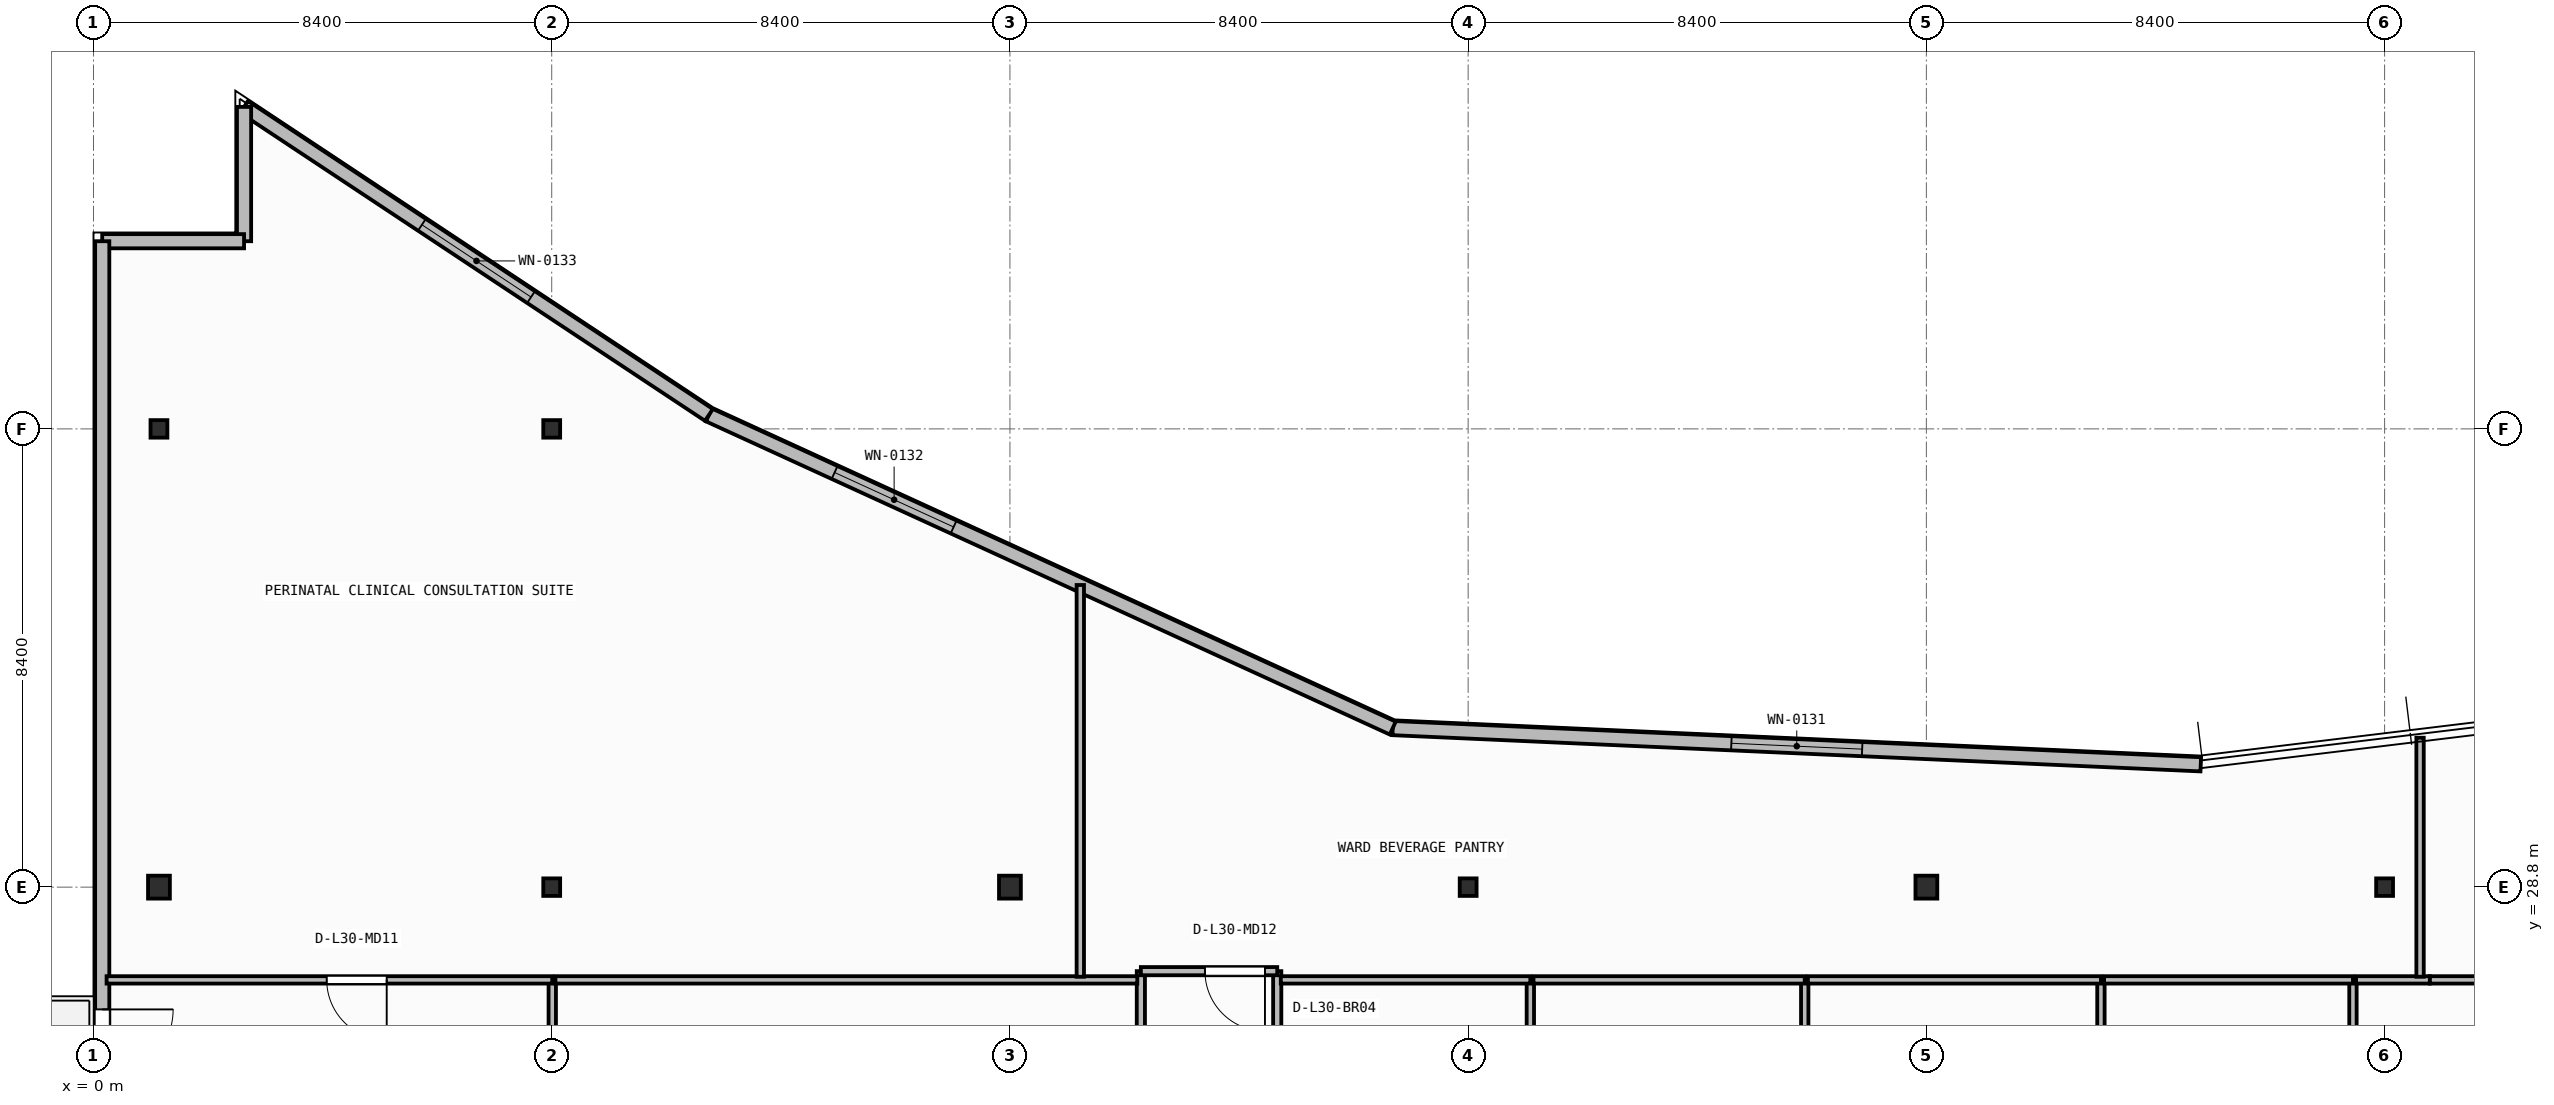
"""IFC4 building model, lengths in metres.
Left out: names, types, materials, properties, quantities, classifications, styles, units other than length and angle.
Written with IfcOpenShell. Run it as: python <this file> out.ifc"""

import sys

from ifc_helpers import new_model, si_unit, direction, frame, frame_2d, origin, origin_2d, place, context, subcontext, project, spatial, rectangle, i_section, extrude, element, fill, save


model = new_model("IFC4")
c1 = context("Model", 3, precision=1e-05, world=origin(), true_north=direction((0.0, 1.0)))
c2 = subcontext(c1, "Body", "Model", "MODEL_VIEW")
j1 = project(units=[si_unit("LENGTHUNIT", "METRE"), si_unit("PLANEANGLEUNIT", "RADIAN")], contexts=[c1])
p1 = place(None, origin())
s1 = spatial("IfcSite", under=j1, at=p1, CompositionType="ELEMENT")
p2 = place(p1, origin())
s2 = spatial("IfcBuilding", under=s1, at=p2, CompositionType="ELEMENT")
p3 = place(p2, frame((0.0, 0.0, 123.1)))
s3 = spatial("IfcBuildingStorey", under=s2, at=p3, CompositionType="ELEMENT", Elevation=123.1)
p4 = place(p3, frame((1.2, 28.8, 0.0), z_axis=(0.0, 0.0, 1.0), x_axis=(1.0, 0.0, 0.0)))
e1 = element("IfcColumn", 1, at=p4, inside=s3, PredefinedType="COLUMN", context=c2, shape_type="SweptSolid", body=[
    extrude(i_section(OverallWidth=0.4, OverallDepth=0.42, WebThickness=0.025, FlangeThickness=0.04, at=origin_2d()), origin(), (0.0, 0.0, 1.0), 3.95),
])
p5 = place(p3, frame((8.4, 28.8, 0.0), z_axis=(0.0, 0.0, 1.0), x_axis=(1.0, 0.0, 0.0)))
e2 = element("IfcColumn", 2, at=p5, inside=s3, PredefinedType="COLUMN", context=c2, shape_type="SweptSolid", body=[
    extrude(i_section(OverallWidth=0.309, OverallDepth=0.321, WebThickness=0.014, FlangeThickness=0.022, FilletRadius=0.017, at=origin_2d()), origin(), (0.0, 0.0, 1.0), 3.95),
])
p6 = place(p3, frame((16.8, 28.8, 0.0), z_axis=(0.0, 0.0, 1.0), x_axis=(1.0, 0.0, 0.0)))
e3 = element("IfcColumn", 3, at=p6, inside=s3, PredefinedType="COLUMN", context=c2, shape_type="SweptSolid", body=[
    extrude(i_section(OverallWidth=0.4, OverallDepth=0.42, WebThickness=0.025, FlangeThickness=0.04, at=origin_2d()), origin(), (0.0, 0.0, 1.0), 3.95),
])
p7 = place(p3, frame((25.2, 28.8, 0.0), z_axis=(0.0, 0.0, 1.0), x_axis=(1.0, 0.0, 0.0)))
e4 = element("IfcColumn", 4, at=p7, inside=s3, PredefinedType="COLUMN", context=c2, shape_type="SweptSolid", body=[
    extrude(i_section(OverallWidth=0.309, OverallDepth=0.321, WebThickness=0.014, FlangeThickness=0.022, FilletRadius=0.017, at=origin_2d()), origin(), (0.0, 0.0, 1.0), 3.95),
])
p8 = place(p3, frame((33.6, 28.8, 0.0), z_axis=(0.0, 0.0, 1.0), x_axis=(1.0, 0.0, 0.0)))
e5 = element("IfcColumn", 5, at=p8, inside=s3, PredefinedType="COLUMN", context=c2, shape_type="SweptSolid", body=[
    extrude(i_section(OverallWidth=0.4, OverallDepth=0.42, WebThickness=0.025, FlangeThickness=0.04, at=origin_2d()), origin(), (0.0, 0.0, 1.0), 3.95),
])
for number, where, z_axis, x_axis in (
    (6, (42.0, 28.8, 0.0), (0.0, 0.0, 1.0), (1.0, 0.0, 0.0)),
    (7, (1.2, 37.2, 0.0), (0.0, 0.0, 1.0), (1.0, 0.0, 0.0)),
    (8, (8.4, 37.2, 0.0), (0.0, 0.0, 1.0), (1.0, 0.0, 0.0)),
):
    element("IfcColumn", number, at=place(p3, frame(where, z_axis=z_axis, x_axis=x_axis)), inside=s3, PredefinedType="COLUMN", context=c2, shape_type="SweptSolid", body=[
        extrude(i_section(OverallWidth=0.309, OverallDepth=0.321, WebThickness=0.014, FlangeThickness=0.022, FilletRadius=0.017, at=origin_2d()), origin(), (0.0, 0.0, 1.0), 3.95),
    ])
p9 = place(p3, frame((38.63, 31.052, 0.0), z_axis=(0.0, 0.0, 1.0), x_axis=(-0.998996592956, 0.044786239663, 0.0)))
e9 = element("IfcWall", 9, at=p9, inside=s3, PredefinedType="STANDARD", context=c2, shape_type="SweptSolid", body=[
    extrude(rectangle(XDim=14.827, YDim=0.26, at=frame_2d((7.414, 0.0))), origin(), (0.0, 0.0, 1.0), 3.71),
])
p10 = place(p9, frame((6.214, 0.0, 0.9)))
e10 = element("IfcOpeningElement", 10, at=p10, cuts=e9, PredefinedType="OPENING", context=c2, shape_type="SweptSolid", body=[
    extrude(rectangle(XDim=2.4, YDim=1.65, at=frame_2d((1.2, 0.825))), frame((0.0, 0.14, 0.0), z_axis=(0.0, -1.0, 0.0), x_axis=(1.0, 0.0, 0.0)), (0.0, 0.0, 1.0), 0.28),
])
p11 = place(p3, frame((23.818, 31.716, 0.0), z_axis=(0.0, 0.0, 1.0), x_axis=(-0.909209527513, 0.416338846471, 0.0)))
e11 = element("IfcWall", 11, at=p11, inside=s3, PredefinedType="STANDARD", context=c2, shape_type="SweptSolid", body=[
    extrude(rectangle(XDim=13.787, YDim=0.26, at=frame_2d((6.894, 0.0))), origin(), (0.0, 0.0, 1.0), 3.71),
])
p12 = place(p11, frame((8.854, 0.0, 0.9)))
e12 = element("IfcOpeningElement", 12, at=p12, cuts=e11, PredefinedType="OPENING", context=c2, shape_type="SweptSolid", body=[
    extrude(rectangle(XDim=2.4, YDim=1.65, at=frame_2d((1.2, 0.825))), frame((0.0, 0.14, 0.0), z_axis=(0.0, -1.0, 0.0), x_axis=(1.0, 0.0, 0.0)), (0.0, 0.0, 1.0), 0.28),
])
p13 = place(p3, frame((11.282, 37.456, 0.0), z_axis=(0.0, 0.0, 1.0), x_axis=(-0.833630474253, 0.552322580017, 0.0)))
e13 = element("IfcWall", 13, at=p13, inside=s3, PredefinedType="STANDARD", context=c2, shape_type="SweptSolid", body=[
    extrude(rectangle(XDim=10.223, YDim=0.26, at=frame_2d((5.111, 0.0))), origin(), (0.0, 0.0, 1.0), 3.71),
])
p14 = place(p13, frame((3.911, 0.0, 0.9)))
e14 = element("IfcOpeningElement", 14, at=p14, cuts=e13, PredefinedType="OPENING", context=c2, shape_type="SweptSolid", body=[
    extrude(rectangle(XDim=2.4, YDim=1.65, at=frame_2d((1.2, 0.825))), frame((0.0, 0.14, 0.0), z_axis=(0.0, -1.0, 0.0), x_axis=(1.0, 0.0, 0.0)), (0.0, 0.0, 1.0), 0.28),
])
p15 = place(p3, frame((2.76, 43.102, 0.0), z_axis=(0.0, 0.0, 1.0), x_axis=(0.0, -1.0, 0.0)))
e15 = element("IfcWall", 15, at=p15, inside=s3, PredefinedType="STANDARD", context=c2, shape_type="SweptSolid", body=[
    extrude(rectangle(XDim=2.462, YDim=0.26, at=frame_2d((1.231, 0.0))), origin(), (0.0, 0.0, 1.0), 3.71),
])
p16 = place(p3, frame((2.76, 40.64, 0.0), z_axis=(0.0, 0.0, 1.0), x_axis=(-1.0, 0.0, 0.0)))
e16 = element("IfcWall", 16, at=p16, inside=s3, PredefinedType="STANDARD", context=c2, shape_type="SweptSolid", body=[
    extrude(rectangle(XDim=2.6, YDim=0.26, at=frame_2d((1.3, 0.0))), origin(), (0.0, 0.0, 1.0), 3.71),
])
p17 = place(p3, frame((0.16, 40.64, 0.0), z_axis=(0.0, 0.0, 1.0), x_axis=(0.0, -1.0, 0.0)))
e17 = element("IfcWall", 17, at=p17, inside=s3, PredefinedType="STANDARD", context=c2, shape_type="SweptSolid", body=[
    extrude(rectangle(XDim=37.88, YDim=0.26, at=frame_2d((18.94, 0.0))), origin(), (0.0, 0.0, 1.0), 3.71),
])
p18 = place(p17, frame((14.081, 0.0, 0.0)))
e18 = element("IfcOpeningElement", 18, at=p18, cuts=e17, PredefinedType="OPENING", context=c2, shape_type="SweptSolid", body=[
    extrude(rectangle(XDim=1.3, YDim=2.15, at=frame_2d((0.65, 1.075))), frame((0.0, 0.14, 0.0), z_axis=(0.0, -1.0, 0.0), x_axis=(1.0, 0.0, 0.0)), (0.0, 0.0, 1.0), 0.28),
])
p19 = place(p17, frame((21.856, 0.0, 0.9)))
e19 = element("IfcOpeningElement", 19, at=p19, cuts=e17, PredefinedType="OPENING", context=c2, shape_type="SweptSolid", body=[
    extrude(rectangle(XDim=2.4, YDim=1.65, at=frame_2d((1.2, 0.825))), frame((0.0, 0.14, 0.0), z_axis=(0.0, -1.0, 0.0), x_axis=(1.0, 0.0, 0.0)), (0.0, 0.0, 1.0), 0.28),
])
p20 = place(p3, frame((19.2, 27.26, 0.0), z_axis=(0.0, 0.0, 1.0), x_axis=(0.0, -1.0, 0.0)))
e20 = element("IfcWall", 20, at=p20, inside=s3, PredefinedType="PARTITIONING", context=c2, shape_type="SweptSolid", body=[
    extrude(rectangle(XDim=6.482, YDim=0.15, at=frame_2d((3.241, 0.0))), origin(), (0.0, 0.0, 1.0), 3.71),
])
p21 = place(p20, frame((2.068, 0.0, 0.0)))
e21 = element("IfcOpeningElement", 21, at=p21, cuts=e20, PredefinedType="OPENING", context=c2, shape_type="SweptSolid", body=[
    extrude(rectangle(XDim=1.1, YDim=2.1, at=frame_2d((0.55, 1.05))), frame((0.0, 0.085, 0.0), z_axis=(0.0, -1.0, 0.0), x_axis=(1.0, 0.0, 0.0)), (0.0, 0.0, 1.0), 0.17),
])
p22 = place(p3, frame((21.7, 23.784, 0.0), z_axis=(0.0, 0.0, 1.0), x_axis=(0.0, 1.0, 0.0)))
e22 = element("IfcWall", 22, at=p22, inside=s3, PredefinedType="PARTITIONING", context=c2, shape_type="SweptSolid", body=[
    extrude(rectangle(XDim=3.476, YDim=0.15, at=frame_2d((1.738, 0.0))), origin(), (0.0, 0.0, 1.0), 3.71),
])
p23 = place(p22, frame((1.088, 0.0, 0.0)))
e23 = element("IfcOpeningElement", 23, at=p23, cuts=e22, PredefinedType="OPENING", context=c2, shape_type="SweptSolid", body=[
    extrude(rectangle(XDim=1.3, YDim=2.15, at=frame_2d((0.65, 1.075))), frame((0.0, 0.085, 0.0), z_axis=(0.0, -1.0, 0.0), x_axis=(1.0, 0.0, 0.0)), (0.0, 0.0, 1.0), 0.17),
])
p24 = place(p3, frame((21.7, 27.26, 0.0), z_axis=(0.0, 0.0, 1.0), x_axis=(-1.0, 0.0, 0.0)))
e24 = element("IfcWall", 24, at=p24, inside=s3, PredefinedType="PARTITIONING", context=c2, shape_type="SweptSolid", body=[
    extrude(rectangle(XDim=2.5, YDim=0.15, at=frame_2d((1.25, 0.0))), origin(), (0.0, 0.0, 1.0), 3.71),
])
p25 = place(p24, frame((0.225, 0.0, 0.0)))
e25 = element("IfcOpeningElement", 25, at=p25, cuts=e24, PredefinedType="OPENING", context=c2, shape_type="SweptSolid", body=[
    extrude(rectangle(XDim=1.1, YDim=2.1, at=frame_2d((0.55, 1.05))), frame((0.0, 0.085, 0.0), z_axis=(0.0, -1.0, 0.0), x_axis=(1.0, 0.0, 0.0)), (0.0, 0.0, 1.0), 0.17),
])
p26 = place(p3, frame((8.41, 20.607, 0.0), z_axis=(0.0, 0.0, 1.0), x_axis=(0.0, 1.0, 0.0)))
e26 = element("IfcWall", 26, at=p26, inside=s3, PredefinedType="PARTITIONING", context=c2, shape_type="SweptSolid", body=[
    extrude(rectangle(XDim=6.493, YDim=0.135, at=frame_2d((3.246, 0.0))), origin(), (0.0, 0.0, 1.0), 3.152),
])
p27 = place(p3, frame((8.41, 27.1, 0.0), z_axis=(0.0, 0.0, 1.0), x_axis=(-1.0, 0.0, 0.0)))
e27 = element("IfcWall", 27, at=p27, inside=s3, PredefinedType="PARTITIONING", context=c2, shape_type="SweptSolid", body=[
    extrude(rectangle(XDim=8.17, YDim=0.135, at=frame_2d((4.085, 0.0))), origin(), (0.0, 0.0, 1.0), 3.71),
])
p28 = place(p27, frame((3.035, 0.0, 0.0)))
e28 = element("IfcOpeningElement", 28, at=p28, cuts=e27, PredefinedType="OPENING", context=c2, shape_type="SweptSolid", body=[
    extrude(rectangle(XDim=1.1, YDim=2.1, at=frame_2d((0.55, 1.05))), frame((0.0, 0.077, 0.0), z_axis=(0.0, -1.0, 0.0), x_axis=(1.0, 0.0, 0.0)), (0.0, 0.0, 1.0), 0.155),
])
p29 = place(p3, frame((19.135, 27.1, 0.0), z_axis=(0.0, 0.0, 1.0), x_axis=(-1.0, 0.0, 0.0)))
e29 = element("IfcWall", 29, at=p29, inside=s3, PredefinedType="PARTITIONING", context=c2, shape_type="SweptSolid", body=[
    extrude(rectangle(XDim=10.667, YDim=0.135, at=frame_2d((5.334, 0.0))), origin(), (0.0, 0.0, 1.0), 3.71),
])
p30 = place(p3, frame((26.34, 23.802, 0.0), z_axis=(0.0, 0.0, 1.0), x_axis=(0.0, 1.0, 0.0)))
e30 = element("IfcWall", 30, at=p30, inside=s3, PredefinedType="PARTITIONING", context=c2, shape_type="SweptSolid", body=[
    extrude(rectangle(XDim=3.298, YDim=0.135, at=frame_2d((1.649, 0.0))), origin(), (0.0, 0.0, 1.0), 3.71),
])
p31 = place(p3, frame((26.34, 27.1, 0.0), z_axis=(0.0, 0.0, 1.0), x_axis=(-1.0, 0.0, 0.0)))
e31 = element("IfcWall", 31, at=p31, inside=s3, PredefinedType="PARTITIONING", context=c2, shape_type="SweptSolid", body=[
    extrude(rectangle(XDim=4.575, YDim=0.135, at=frame_2d((2.288, 0.0))), origin(), (0.0, 0.0, 1.0), 3.71),
])
p32 = place(p3, frame((31.37, 23.802, 0.0), z_axis=(0.0, 0.0, 1.0), x_axis=(0.0, 1.0, 0.0)))
e32 = element("IfcWall", 32, at=p32, inside=s3, PredefinedType="PARTITIONING", context=c2, shape_type="SweptSolid", body=[
    extrude(rectangle(XDim=3.298, YDim=0.135, at=frame_2d((1.649, 0.0))), origin(), (0.0, 0.0, 1.0), 3.71),
])
p33 = place(p3, frame((31.37, 27.1, 0.0), z_axis=(0.0, 0.0, 1.0), x_axis=(-1.0, 0.0, 0.0)))
e33 = element("IfcWall", 33, at=p33, inside=s3, PredefinedType="PARTITIONING", context=c2, shape_type="SweptSolid", body=[
    extrude(rectangle(XDim=4.973, YDim=0.135, at=frame_2d((2.486, 0.0))), origin(), (0.0, 0.0, 1.0), 3.71),
])
p34 = place(p3, frame((36.8, 20.715, 0.0), z_axis=(0.0, 0.0, 1.0), x_axis=(0.0, 1.0, 0.0)))
e34 = element("IfcWall", 34, at=p34, inside=s3, PredefinedType="PARTITIONING", context=c2, shape_type="SweptSolid", body=[
    extrude(rectangle(XDim=6.385, YDim=0.135, at=frame_2d((3.192, 0.0))), origin(), (0.0, 0.0, 1.0), 3.71),
])
p35 = place(p3, frame((36.8, 27.1, 0.0), z_axis=(0.0, 0.0, 1.0), x_axis=(-1.0, 0.0, 0.0)))
e35 = element("IfcWall", 35, at=p35, inside=s3, PredefinedType="PARTITIONING", context=c2, shape_type="SweptSolid", body=[
    extrude(rectangle(XDim=5.373, YDim=0.135, at=frame_2d((2.686, 0.0))), origin(), (0.0, 0.0, 1.0), 3.71),
])
p36 = place(p3, frame((41.42, 20.715, 0.0), z_axis=(0.0, 0.0, 1.0), x_axis=(0.0, 1.0, 0.0)))
e36 = element("IfcWall", 36, at=p36, inside=s3, PredefinedType="PARTITIONING", context=c2, shape_type="SweptSolid", body=[
    extrude(rectangle(XDim=6.385, YDim=0.135, at=frame_2d((3.192, 0.0))), origin(), (0.0, 0.0, 1.0), 3.71),
])
p37 = place(p3, frame((41.42, 27.1, 0.0), z_axis=(0.0, 0.0, 1.0), x_axis=(-1.0, 0.0, 0.0)))
e37 = element("IfcWall", 37, at=p37, inside=s3, PredefinedType="PARTITIONING", context=c2, shape_type="SweptSolid", body=[
    extrude(rectangle(XDim=4.562, YDim=0.135, at=frame_2d((2.281, 0.0))), origin(), (0.0, 0.0, 1.0), 3.71),
])
p38 = place(p3, frame((42.829, 27.1, 0.0), z_axis=(0.0, 0.0, 1.0), x_axis=(-1.0, 0.0, 0.0)))
e38 = element("IfcWall", 38, at=p38, inside=s3, PredefinedType="PARTITIONING", context=c2, shape_type="SweptSolid", body=[
    extrude(rectangle(XDim=1.351, YDim=0.135, at=frame_2d((0.676, 0.0))), origin(), (0.0, 0.0, 1.0), 3.71),
])
p39 = place(p3, frame((46.45, 27.1, 0.0), z_axis=(0.0, 0.0, 1.0), x_axis=(-1.0, 0.0, 0.0)))
e39 = element("IfcWall", 39, at=p39, inside=s3, PredefinedType="PARTITIONING", context=c2, shape_type="SweptSolid", body=[
    extrude(rectangle(XDim=3.619, YDim=0.135, at=frame_2d((1.81, 0.0))), origin(), (0.0, 0.0, 1.0), 3.71),
])
p40 = place(p39, frame((0.253, 0.0, 0.0)))
e40 = element("IfcOpeningElement", 40, at=p40, cuts=e39, PredefinedType="OPENING", context=c2, shape_type="SweptSolid", body=[
    extrude(rectangle(XDim=1.1, YDim=2.1, at=frame_2d((0.55, 1.05))), frame((0.0, 0.077, 0.0), z_axis=(0.0, -1.0, 0.0), x_axis=(1.0, 0.0, 0.0)), (0.0, 0.0, 1.0), 0.155),
])
p41 = place(p3, frame((18.09, 27.157, 0.0), z_axis=(0.0, 0.0, 1.0), x_axis=(0.0, 1.0, 0.0)))
e41 = element("IfcWall", 41, at=p41, inside=s3, PredefinedType="PARTITIONING", context=c2, shape_type="SweptSolid", body=[
    extrude(rectangle(XDim=7.181, YDim=0.135, at=frame_2d((3.59, 0.0))), origin(), (0.0, 0.0, 1.0), 3.71),
])
p42 = place(p3, frame((42.65, 27.157, 0.0), z_axis=(0.0, 0.0, 1.0), x_axis=(0.0, 1.0, 0.0)))
e42 = element("IfcWall", 42, at=p42, inside=s3, PredefinedType="PARTITIONING", context=c2, shape_type="SweptSolid", body=[
    extrude(rectangle(XDim=4.381, YDim=0.135, at=frame_2d((2.191, 0.0))), origin(), (0.0, 0.0, 1.0), 3.71),
])
p43 = place(p10, origin())
e43 = element("IfcWindow", 43, at=p43, inside=s3, PartitioningType="SINGLE_PANEL", PredefinedType="WINDOW", context=c2, shape_type="SweptSolid", body=[
    extrude(rectangle(XDim=2.4, YDim=1.65, at=frame_2d((1.2, 0.825))), frame((0.0, 0.03, 0.0), z_axis=(0.0, -1.0, 0.0), x_axis=(1.0, 0.0, 0.0)), (0.0, 0.0, 1.0), 0.06),
])
fill(e10, e43)
p44 = place(p12, origin())
e44 = element("IfcWindow", 44, at=p44, inside=s3, PartitioningType="SINGLE_PANEL", PredefinedType="WINDOW", context=c2, shape_type="SweptSolid", body=[
    extrude(rectangle(XDim=2.4, YDim=1.65, at=frame_2d((1.2, 0.825))), frame((0.0, 0.03, 0.0), z_axis=(0.0, -1.0, 0.0), x_axis=(1.0, 0.0, 0.0)), (0.0, 0.0, 1.0), 0.06),
])
fill(e12, e44)
p45 = place(p14, origin())
e45 = element("IfcWindow", 45, at=p45, inside=s3, PartitioningType="SINGLE_PANEL", PredefinedType="WINDOW", context=c2, shape_type="SweptSolid", body=[
    extrude(rectangle(XDim=2.4, YDim=1.65, at=frame_2d((1.2, 0.825))), frame((0.0, 0.03, 0.0), z_axis=(0.0, -1.0, 0.0), x_axis=(1.0, 0.0, 0.0)), (0.0, 0.0, 1.0), 0.06),
])
fill(e14, e45)
p46 = place(p18, origin())
e46 = element("IfcDoor", 46, at=p46, inside=s3, OperationType="SINGLE_SWING_LEFT", PredefinedType="DOOR", context=c2, shape_type="SweptSolid", body=[
    extrude(rectangle(XDim=1.3, YDim=2.15, at=frame_2d((0.65, 1.075))), frame((0.0, 0.025, 0.0), z_axis=(0.0, -1.0, 0.0), x_axis=(1.0, 0.0, 0.0)), (0.0, 0.0, 1.0), 0.05),
])
fill(e18, e46)
p47 = place(p25, origin())
e47 = element("IfcDoor", 47, at=p47, inside=s3, OperationType="SINGLE_SWING_LEFT", PredefinedType="DOOR", context=c2, shape_type="SweptSolid", body=[
    extrude(rectangle(XDim=1.1, YDim=2.1, at=frame_2d((0.55, 1.05))), frame((0.0, 0.025, 0.0), z_axis=(0.0, -1.0, 0.0), x_axis=(1.0, 0.0, 0.0)), (0.0, 0.0, 1.0), 0.05),
])
fill(e25, e47)
p48 = place(p28, origin())
e48 = element("IfcDoor", 48, at=p48, inside=s3, OperationType="SINGLE_SWING_LEFT", PredefinedType="DOOR", context=c2, shape_type="SweptSolid", body=[
    extrude(rectangle(XDim=1.1, YDim=2.1, at=frame_2d((0.55, 1.05))), frame((0.0, 0.025, 0.0), z_axis=(0.0, -1.0, 0.0), x_axis=(1.0, 0.0, 0.0)), (0.0, 0.0, 1.0), 0.05),
])
fill(e28, e48)
save(model, sys.argv[1])
